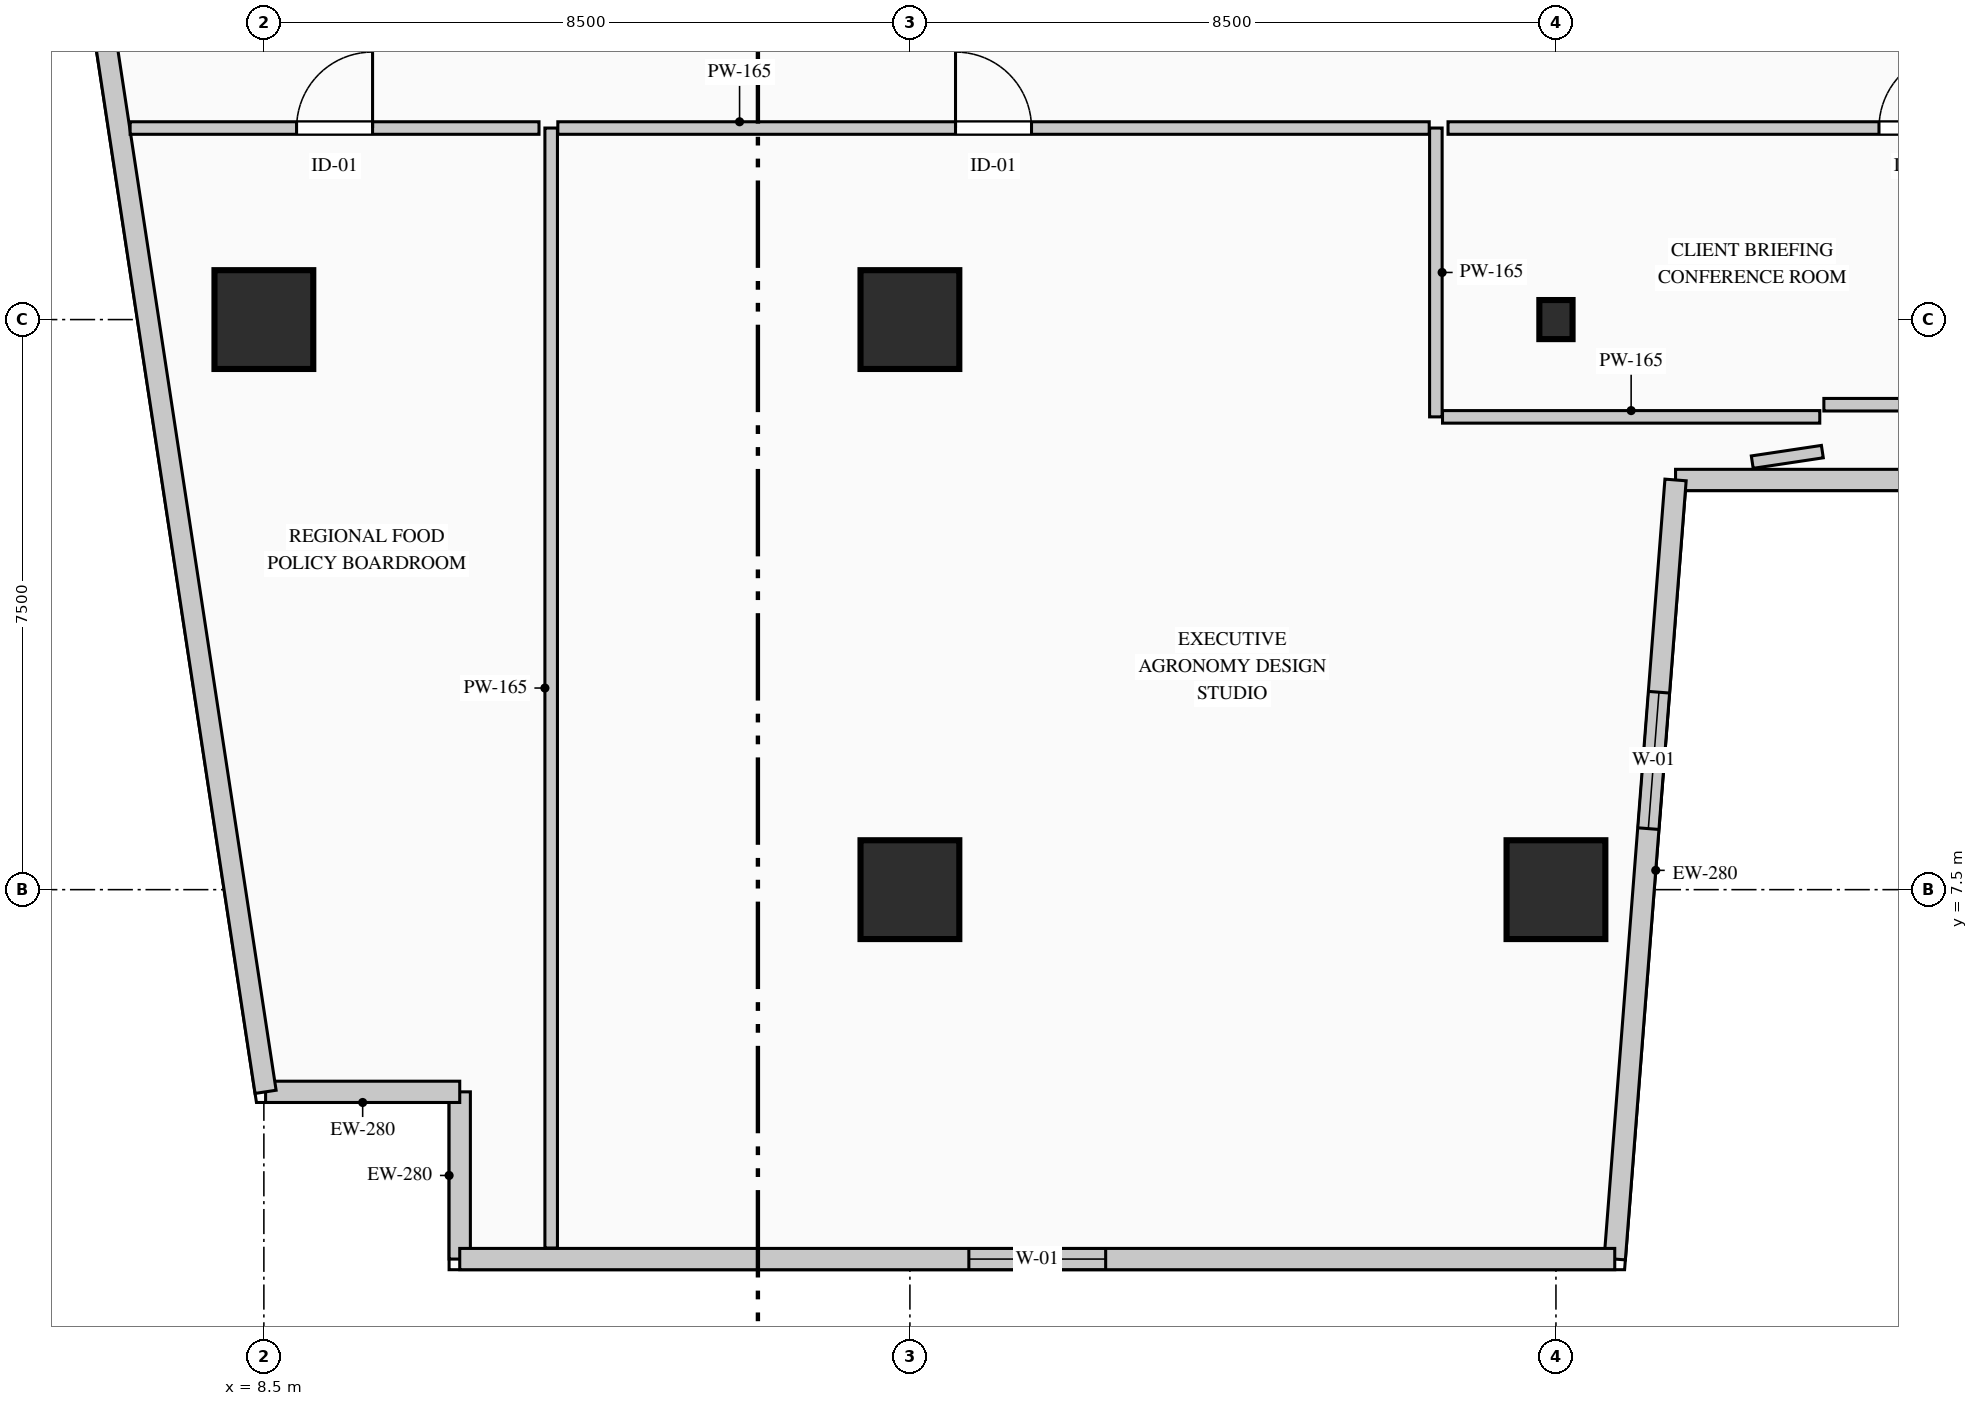
"""IFC4 building model, lengths in metres.
Left out: names, types, materials, properties, quantities, classifications, styles, units other than length and angle.
Written with IfcOpenShell. Run it as: python <this file> out.ifc"""

import sys

from ifc_helpers import new_model, si_unit, direction, frame, frame_2d, origin, origin_2d, place, context, subcontext, project, spatial, rectangle, i_section, extrude, element, fill, save


model = new_model("IFC4")
c1 = context("Model", 3, precision=1e-05, world=origin(), true_north=direction((0.0, 1.0)))
c2 = subcontext(c1, "Body", "Model", "MODEL_VIEW")
j1 = project(units=[si_unit("LENGTHUNIT", "METRE"), si_unit("PLANEANGLEUNIT", "RADIAN")], contexts=[c1])
p1 = place(None, origin())
s1 = spatial("IfcSite", under=j1, at=p1, CompositionType="ELEMENT")
p2 = place(p1, origin())
s2 = spatial("IfcBuilding", under=s1, at=p2, CompositionType="ELEMENT")
p3 = place(p2, frame((0.0, 0.0, 93.0)))
s3 = spatial("IfcBuildingStorey", under=s2, at=p3, CompositionType="ELEMENT", Elevation=93.0)
for number, where, z_axis, x_axis in (
    (1, (8.5, 15.0, 0.0), (0.0, 0.0, 1.0), (1.0, 0.0, 0.0)),
    (2, (17.0, 7.5, 0.0), (0.0, 0.0, 1.0), (1.0, 0.0, 0.0)),
    (3, (17.0, 15.0, 0.0), (0.0, 0.0, 1.0), (1.0, 0.0, 0.0)),
    (4, (25.5, 7.5, 0.0), (0.0, 0.0, 1.0), (1.0, 0.0, 0.0)),
):
    element("IfcColumn", number, at=place(p3, frame(where, z_axis=z_axis, x_axis=x_axis)), inside=s3, PredefinedType="COLUMN", context=c2, shape_type="SweptSolid", body=[
        extrude(rectangle(XDim=1.3, YDim=1.3, at=origin_2d()), origin(), (0.0, 0.0, 1.0), 4.4),
    ])
p4 = place(p3, frame((25.5, 15.0, 0.0), z_axis=(0.0, 0.0, 1.0), x_axis=(1.0, 0.0, 0.0)))
e5 = element("IfcColumn", 5, at=p4, inside=s3, PredefinedType="COLUMN", context=c2, shape_type="SweptSolid", body=[
    extrude(i_section(OverallWidth=0.437, OverallDepth=0.514, WebThickness=0.061, FlangeThickness=0.077, FilletRadius=0.015, at=origin_2d()), origin(), (0.0, 0.0, 1.0), 4.4),
])
p5 = place(p3, frame((11.077, 2.64, 0.0), z_axis=(0.0, 0.0, 1.0), x_axis=(0.0, 1.0, 0.0)))
e6 = element("IfcWall", 6, at=p5, inside=s3, PredefinedType="STANDARD", context=c2, shape_type="SweptSolid", body=[
    extrude(rectangle(XDim=2.2, YDim=0.28, at=frame_2d((1.1, 0.0))), origin(), (0.0, 0.0, 1.0), 4.115),
])
p6 = place(p3, frame((11.077, 4.84, 0.0), z_axis=(0.0, 0.0, 1.0), x_axis=(-1.0, 0.0, 0.0)))
e7 = element("IfcWall", 7, at=p6, inside=s3, PredefinedType="STANDARD", context=c2, shape_type="SweptSolid", body=[
    extrude(rectangle(XDim=2.554, YDim=0.28, at=frame_2d((1.277, 0.0))), origin(), (0.0, 0.0, 1.0), 4.115),
])
p7 = place(p3, frame((8.523, 4.84, 0.0), z_axis=(0.0, 0.0, 1.0), x_axis=(-0.150394554312, 0.988626055712, 0.0)))
e8 = element("IfcWall", 8, at=p7, inside=s3, PredefinedType="STANDARD", context=c2, shape_type="SweptSolid", body=[
    extrude(rectangle(XDim=36.738, YDim=0.28, at=frame_2d((18.369, 0.0))), origin(), (0.0, 0.0, 1.0), 4.115),
])
p8 = place(p7, frame((22.612, 0.0, 0.9)))
e9 = element("IfcOpeningElement", 9, at=p8, cuts=e8, PredefinedType="OPENING", context=c2, shape_type="SweptSolid", body=[
    extrude(rectangle(XDim=1.8, YDim=2.1, at=frame_2d((0.9, 1.05))), frame((0.0, 0.15, 0.0), z_axis=(0.0, -1.0, 0.0), x_axis=(1.0, 0.0, 0.0)), (0.0, 0.0, 1.0), 0.3),
])
p9 = place(p3, frame((35.77, 12.89, 0.0), z_axis=(0.0, 0.0, 1.0), x_axis=(-1.0, 0.0, 0.0)))
e10 = element("IfcWall", 10, at=p9, inside=s3, PredefinedType="STANDARD", context=c2, shape_type="SweptSolid", body=[
    extrude(rectangle(XDim=8.697, YDim=0.28, at=frame_2d((4.348, 0.0))), origin(), (0.0, 0.0, 1.0), 4.115),
])
p10 = place(p9, frame((3.448, 0.0, 0.9)))
e11 = element("IfcOpeningElement", 11, at=p10, cuts=e10, PredefinedType="OPENING", context=c2, shape_type="SweptSolid", body=[
    extrude(rectangle(XDim=1.8, YDim=2.1, at=frame_2d((0.9, 1.05))), frame((0.0, 0.15, 0.0), z_axis=(0.0, -1.0, 0.0), x_axis=(1.0, 0.0, 0.0)), (0.0, 0.0, 1.0), 0.3),
])
p11 = place(p3, frame((27.073, 12.89, 0.0), z_axis=(0.0, 0.0, 1.0), x_axis=(-0.077816860153, -0.996967670627, 0.0)))
e12 = element("IfcWall", 12, at=p11, inside=s3, PredefinedType="STANDARD", context=c2, shape_type="SweptSolid", body=[
    extrude(rectangle(XDim=10.281, YDim=0.28, at=frame_2d((5.141, 0.0))), origin(), (0.0, 0.0, 1.0), 4.115),
])
p12 = place(p11, frame((2.801, 0.0, 0.9)))
e13 = element("IfcOpeningElement", 13, at=p12, cuts=e12, PredefinedType="OPENING", context=c2, shape_type="SweptSolid", body=[
    extrude(rectangle(XDim=1.8, YDim=2.1, at=frame_2d((0.9, 1.05))), frame((0.0, 0.15, 0.0), z_axis=(0.0, -1.0, 0.0), x_axis=(1.0, 0.0, 0.0)), (0.0, 0.0, 1.0), 0.3),
])
p13 = place(p3, frame((26.273, 2.64, 0.0), z_axis=(0.0, 0.0, 1.0), x_axis=(-1.0, 0.0, 0.0)))
e14 = element("IfcWall", 14, at=p13, inside=s3, PredefinedType="STANDARD", context=c2, shape_type="SweptSolid", body=[
    extrude(rectangle(XDim=15.197, YDim=0.28, at=frame_2d((7.598, 0.0))), origin(), (0.0, 0.0, 1.0), 4.115),
])
p14 = place(p13, frame((6.698, 0.0, 0.9)))
e15 = element("IfcOpeningElement", 15, at=p14, cuts=e14, PredefinedType="OPENING", context=c2, shape_type="SweptSolid", body=[
    extrude(rectangle(XDim=1.8, YDim=2.1, at=frame_2d((0.9, 1.05))), frame((0.0, 0.15, 0.0), z_axis=(0.0, -1.0, 0.0), x_axis=(1.0, 0.0, 0.0)), (0.0, 0.0, 1.0), 0.3),
])
p15 = place(p3, frame((23.92, 17.52, 0.0), z_axis=(0.0, 0.0, 1.0), x_axis=(0.0, -1.0, 0.0)))
e16 = element("IfcWall", 16, at=p15, inside=s3, PredefinedType="PARTITIONING", context=c2, shape_type="SweptSolid", body=[
    extrude(rectangle(XDim=3.8, YDim=0.165, at=frame_2d((1.9, 0.0))), origin(), (0.0, 0.0, 1.0), 3.7),
])
p16 = place(p3, frame((24.008, 13.72, 0.0), z_axis=(0.0, 0.0, 1.0), x_axis=(1.0, 0.0, 0.0)))
e17 = element("IfcWall", 17, at=p16, inside=s3, PredefinedType="PARTITIONING", context=c2, shape_type="SweptSolid", body=[
    extrude(rectangle(XDim=4.963, YDim=0.165, at=frame_2d((2.482, 0.0))), origin(), (0.0, 0.0, 1.0), 4.115),
])
p17 = place(p3, frame((29.005, 13.263, 0.0), z_axis=(0.0, 0.0, 1.0), x_axis=(-0.988919061759, -0.148455681233, 0.0)))
e18 = element("IfcWall", 18, at=p17, inside=s3, PredefinedType="PARTITIONING", context=c2, shape_type="SweptSolid", body=[
    extrude(rectangle(XDim=0.932, YDim=0.165, at=frame_2d((0.466, 0.0))), origin(), (0.0, 0.0, 1.0), 4.115),
])
p18 = place(p3, frame((12.28, 2.785, 0.0), z_axis=(0.0, 0.0, 1.0), x_axis=(0.0, 1.0, 0.0)))
e19 = element("IfcWall", 19, at=p18, inside=s3, PredefinedType="PARTITIONING", context=c2, shape_type="SweptSolid", body=[
    extrude(rectangle(XDim=14.735, YDim=0.165, at=frame_2d((7.368, 0.0))), origin(), (0.0, 0.0, 1.0), 4.115),
])
p19 = place(p3, frame((12.367, 17.52, 0.0), z_axis=(0.0, 0.0, 1.0), x_axis=(1.0, 0.0, 0.0)))
e20 = element("IfcWall", 20, at=p19, inside=s3, PredefinedType="PARTITIONING", context=c2, shape_type="SweptSolid", body=[
    extrude(rectangle(XDim=11.465, YDim=0.165, at=frame_2d((5.732, 0.0))), origin(), (0.0, 0.0, 1.0), 4.115),
])
p20 = place(p19, frame((5.232, 0.0, 0.0)))
e21 = element("IfcOpeningElement", 21, at=p20, cuts=e20, PredefinedType="OPENING", context=c2, shape_type="SweptSolid", body=[
    extrude(rectangle(XDim=1.0, YDim=2.15, at=frame_2d((0.5, 1.075))), frame((0.0, 0.093, 0.0), z_axis=(0.0, -1.0, 0.0), x_axis=(1.0, 0.0, 0.0)), (0.0, 0.0, 1.0), 0.185),
])
p21 = place(p3, frame((6.74, 17.52, 0.0), z_axis=(0.0, 0.0, 1.0), x_axis=(1.0, 0.0, 0.0)))
e22 = element("IfcWall", 22, at=p21, inside=s3, PredefinedType="PARTITIONING", context=c2, shape_type="SweptSolid", body=[
    extrude(rectangle(XDim=5.38, YDim=0.165, at=frame_2d((2.69, 0.0))), origin(), (0.0, 0.0, 1.0), 4.115),
])
p22 = place(p21, frame((2.19, 0.0, 0.0)))
e23 = element("IfcOpeningElement", 23, at=p22, cuts=e22, PredefinedType="OPENING", context=c2, shape_type="SweptSolid", body=[
    extrude(rectangle(XDim=1.0, YDim=2.15, at=frame_2d((0.5, 1.075))), frame((0.0, 0.093, 0.0), z_axis=(0.0, -1.0, 0.0), x_axis=(1.0, 0.0, 0.0)), (0.0, 0.0, 1.0), 0.185),
])
p23 = place(p3, frame((24.08, 17.52, 0.0), z_axis=(0.0, 0.0, 1.0), x_axis=(1.0, 0.0, 0.0)))
e24 = element("IfcWall", 24, at=p23, inside=s3, PredefinedType="PARTITIONING", context=c2, shape_type="SweptSolid", body=[
    extrude(rectangle(XDim=12.34, YDim=0.165, at=frame_2d((6.17, 0.0))), origin(), (0.0, 0.0, 1.0), 3.7),
])
p24 = place(p23, frame((5.67, 0.0, 0.0)))
e25 = element("IfcOpeningElement", 25, at=p24, cuts=e24, PredefinedType="OPENING", context=c2, shape_type="SweptSolid", body=[
    extrude(rectangle(XDim=1.0, YDim=2.15, at=frame_2d((0.5, 1.075))), frame((0.0, 0.093, 0.0), z_axis=(0.0, -1.0, 0.0), x_axis=(1.0, 0.0, 0.0)), (0.0, 0.0, 1.0), 0.185),
])
p25 = place(p3, frame((36.42, 13.88, 0.0), z_axis=(0.0, 0.0, 1.0), x_axis=(-1.0, 0.0, 0.0)))
e26 = element("IfcWall", 26, at=p25, inside=s3, PredefinedType="PARTITIONING", context=c2, shape_type="SweptSolid", body=[
    extrude(rectangle(XDim=7.395, YDim=0.165, at=frame_2d((3.698, 0.0))), origin(), (0.0, 0.0, 1.0), 4.115),
])
p26 = place(p12, origin())
e27 = element("IfcWindow", 27, at=p26, inside=s3, PartitioningType="SINGLE_PANEL", PredefinedType="WINDOW", context=c2, shape_type="SweptSolid", body=[
    extrude(rectangle(XDim=1.8, YDim=2.1, at=frame_2d((0.9, 1.05))), frame((0.0, 0.03, 0.0), z_axis=(0.0, -1.0, 0.0), x_axis=(1.0, 0.0, 0.0)), (0.0, 0.0, 1.0), 0.06),
])
fill(e13, e27)
p27 = place(p14, origin())
e28 = element("IfcWindow", 28, at=p27, inside=s3, PartitioningType="SINGLE_PANEL", PredefinedType="WINDOW", context=c2, shape_type="SweptSolid", body=[
    extrude(rectangle(XDim=1.8, YDim=2.1, at=frame_2d((0.9, 1.05))), frame((0.0, 0.03, 0.0), z_axis=(0.0, -1.0, 0.0), x_axis=(1.0, 0.0, 0.0)), (0.0, 0.0, 1.0), 0.06),
])
fill(e15, e28)
p28 = place(p20, origin())
e29 = element("IfcDoor", 29, at=p28, inside=s3, OperationType="SINGLE_SWING_LEFT", PredefinedType="DOOR", context=c2, shape_type="SweptSolid", body=[
    extrude(rectangle(XDim=1.0, YDim=2.15, at=frame_2d((0.5, 1.075))), frame((0.0, 0.025, 0.0), z_axis=(0.0, -1.0, 0.0), x_axis=(1.0, 0.0, 0.0)), (0.0, 0.0, 1.0), 0.05),
])
fill(e21, e29)
p29 = place(p22, origin())
e30 = element("IfcDoor", 30, at=p29, inside=s3, OperationType="SINGLE_SWING_RIGHT", PredefinedType="DOOR", context=c2, shape_type="SweptSolid", body=[
    extrude(rectangle(XDim=1.0, YDim=2.15, at=frame_2d((0.5, 1.075))), frame((0.0, 0.025, 0.0), z_axis=(0.0, -1.0, 0.0), x_axis=(1.0, 0.0, 0.0)), (0.0, 0.0, 1.0), 0.05),
])
fill(e23, e30)
p30 = place(p24, origin())
e31 = element("IfcDoor", 31, at=p30, inside=s3, OperationType="SINGLE_SWING_RIGHT", PredefinedType="DOOR", context=c2, shape_type="SweptSolid", body=[
    extrude(rectangle(XDim=1.0, YDim=2.15, at=frame_2d((0.5, 1.075))), frame((0.0, 0.025, 0.0), z_axis=(0.0, -1.0, 0.0), x_axis=(1.0, 0.0, 0.0)), (0.0, 0.0, 1.0), 0.05),
])
fill(e25, e31)
save(model, sys.argv[1])
